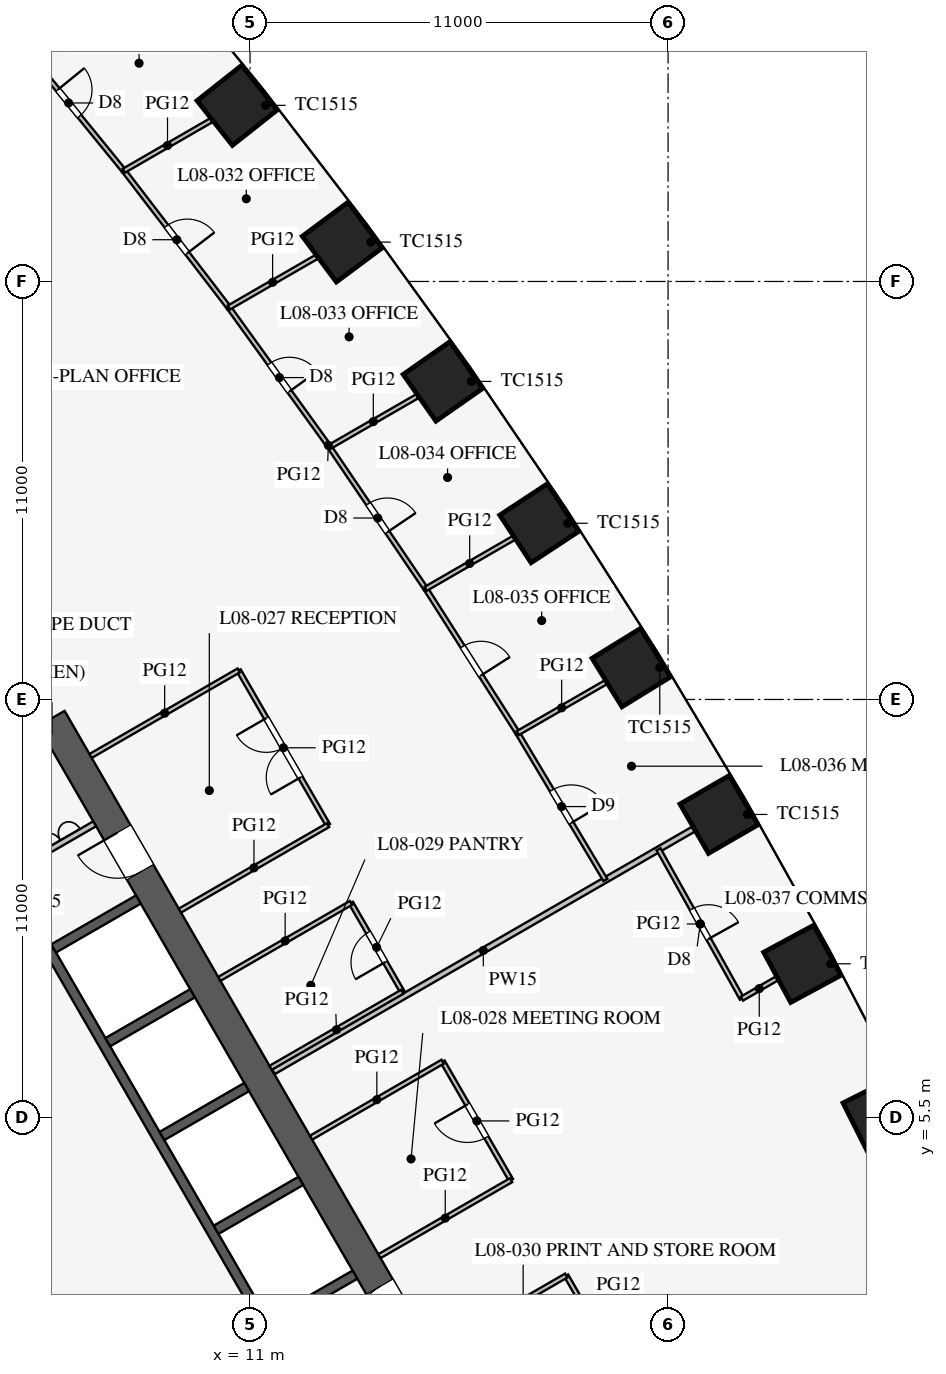
"""IFC4 building model, lengths in metres.
Left out: names, types, materials, properties, quantities, classifications, styles, units other than length and angle.
Written with IfcOpenShell. Run it as: python <this file> out.ifc"""

import sys

from ifc_helpers import new_model, si_unit, direction, frame, frame_2d, origin, origin_2d, place, context, subcontext, project, spatial, rectangle, extrude, element, fill, save


model = new_model("IFC4")
c1 = context("Model", 3, precision=1e-05, world=origin(), true_north=direction((0.0, 1.0)))
c2 = subcontext(c1, "Body", "Model", "MODEL_VIEW")
j1 = project(units=[si_unit("LENGTHUNIT", "METRE"), si_unit("PLANEANGLEUNIT", "RADIAN")], contexts=[c1])
p1 = place(None, origin())
s1 = spatial("IfcSite", under=j1, at=p1, CompositionType="ELEMENT")
p2 = place(p1, origin())
s2 = spatial("IfcBuilding", under=s1, at=p2, CompositionType="ELEMENT")
p3 = place(p2, frame((0.0, 0.0, 37.5)))
s3 = spatial("IfcBuildingStorey", under=s2, at=p3, CompositionType="ELEMENT", Elevation=37.5)
for number, where, z_axis, x_axis in (
    (1, (27.611, 5.549, 0.0), (0.0, 0.0, 1.0), (-0.449, 0.894, 0.0)),
    (2, (25.531, 9.544, 0.0), (0.0, 0.0, 1.0), (-0.475, 0.88, 0.0)),
    (3, (23.338, 13.474, 0.0), (0.0, 0.0, 1.0), (-0.5, 0.866, 0.0)),
    (4, (21.031, 17.339, 0.0), (0.0, 0.0, 1.0), (-0.525, 0.851, 0.0)),
    (5, (18.611, 21.137, 0.0), (0.0, 0.0, 1.0), (-0.549, 0.836, 0.0)),
    (6, (16.076, 24.87, 0.0), (0.0, 0.0, 1.0), (-0.574, 0.819, 0.0)),
    (7, (13.426, 28.536, 0.0), (0.0, 0.0, 1.0), (-0.597, 0.802, 0.0)),
    (8, (10.66, 32.135, 0.0), (0.0, 0.0, 1.0), (-0.62, 0.784, 0.0)),
):
    element("IfcColumn", number, at=place(p3, frame(where, z_axis=z_axis, x_axis=x_axis)), inside=s3, PredefinedType="COLUMN", context=c2, shape_type="SweptSolid", body=[
        extrude(rectangle(XDim=1.5, YDim=1.5, at=origin_2d()), origin(), (0.0, 0.0, 1.0), 4.2),
    ])
p4 = place(p3, frame((16.743, -3.0, 0.0), z_axis=(0.0, 0.0, 1.0), x_axis=(-0.500002442456, 0.866023993627, 0.0)))
e9 = element("IfcWall", 9, at=p4, inside=s3, PredefinedType="SHEAR", context=c2, shape_type="SweptSolid", body=[
    extrude(rectangle(XDim=21.939, YDim=0.8, at=frame_2d((10.97, 0.0))), origin(), (0.0, 0.0, 1.0), 4.2),
])
p5 = place(p4, frame((17.27, 0.0, 0.0)))
e10 = element("IfcOpeningElement", 10, at=p5, cuts=e9, PredefinedType="OPENING", context=c2, shape_type="SweptSolid", body=[
    extrude(rectangle(XDim=1.2, YDim=2.1, at=frame_2d((0.6, 1.05))), frame((0.0, 0.41, 0.0), z_axis=(0.0, -1.0, 0.0), x_axis=(1.0, 0.0, 0.0)), (0.0, 0.0, 1.0), 0.82),
])
p6 = place(p4, frame((3.47, 0.0, 0.0)))
e11 = element("IfcOpeningElement", 11, at=p6, cuts=e9, PredefinedType="OPENING", context=c2, shape_type="SweptSolid", body=[
    extrude(rectangle(XDim=1.2, YDim=2.1, at=frame_2d((0.6, 1.05))), frame((0.0, 0.41, 0.0), z_axis=(0.0, -1.0, 0.0), x_axis=(1.0, 0.0, 0.0)), (0.0, 0.0, 1.0), 0.82),
])
p7 = place(p3, frame((11.424, 0.014, 0.0), z_axis=(0.0, 0.0, 1.0), x_axis=(-0.500001763848, 0.866024385424, 0.0)))
e12 = element("IfcWall", 12, at=p7, inside=s3, PredefinedType="SHEAR", context=c2, shape_type="SweptSolid", body=[
    extrude(rectangle(XDim=11.4, YDim=0.25, at=frame_2d((5.7, 0.0))), origin(), (0.0, 0.0, 1.0), 4.2),
])
for number, where, z_axis, x_axis in (
    (13, (11.532, 0.076, 0.0), (0.0, 0.0, 1.0), (0.866, 0.5, 0.0)),
    (14, (10.107, 2.544, 0.0), (0.0, 0.0, 1.0), (0.866, 0.5, 0.0)),
    (15, (8.682, 5.012, 0.0), (0.0, 0.0, 1.0), (0.866, 0.5, 0.0)),
    (16, (7.257, 7.481, 0.0), (0.0, 0.0, 1.0), (0.866, 0.5, 0.0)),
):
    element("IfcWall", number, at=place(p3, frame(where, z_axis=z_axis, x_axis=x_axis)), inside=s3, PredefinedType="SHEAR", context=c2, shape_type="SweptSolid", body=[
        extrude(rectangle(XDim=2.575, YDim=0.25, at=frame_2d((1.288, 0.0))), origin(), (0.0, 0.0, 1.0), 4.2),
    ])
p8 = place(p3, frame((5.832, 9.949, 0.0), z_axis=(0.0, 0.0, 1.0), x_axis=(0.866029291668, 0.499993265928, 0.0)))
e17 = element("IfcWall", 17, at=p8, inside=s3, PredefinedType="SHEAR", context=c2, shape_type="SweptSolid", body=[
    extrude(rectangle(XDim=2.575, YDim=0.25, at=frame_2d((1.288, 0.0))), origin(), (0.0, 0.0, 1.0), 4.2),
])
p9 = place(p3, frame((2.495, 10.678, 0.0), z_axis=(0.0, 0.0, 1.0), x_axis=(0.86602216432, 0.500005610874, 0.0)))
e18 = element("IfcWall", 18, at=p9, inside=s3, PredefinedType="PARTITIONING", context=c2, shape_type="SweptSolid", body=[
    extrude(rectangle(XDim=5.1, YDim=0.15, at=frame_2d((2.55, 0.0))), origin(), (0.0, 0.0, 1.0), 4.0),
])
p10 = place(p9, frame((1.3, 0.0, 0.0)))
e19 = element("IfcOpeningElement", 19, at=p10, cuts=e18, PredefinedType="OPENING", context=c2, shape_type="SweptSolid", body=[
    extrude(rectangle(XDim=0.9, YDim=2.1, at=frame_2d((0.45, 1.05))), frame((0.0, 0.085, 0.0), z_axis=(0.0, -1.0, 0.0), x_axis=(1.0, 0.0, 0.0)), (0.0, 0.0, 1.0), 0.17),
])
p11 = place(p3, frame((11.613, 6.705, 0.0), z_axis=(0.0, 0.0, 1.0), x_axis=(0.86602785495, 0.499995754432, 0.0)))
e20 = element("IfcWall", 20, at=p11, inside=s3, PredefinedType="PARTITIONING", context=c2, shape_type="SweptSolid", body=[
    extrude(rectangle(XDim=12.759, YDim=0.15, at=frame_2d((6.379, 0.0))), origin(), (0.0, 0.0, 1.0), 3.2),
])
p12 = place(p3, frame((15.006, 8.808, 0.0), z_axis=(0.0, 0.0, 1.0), x_axis=(-0.500048589285, 0.86599734893, 0.0)))
e21 = element("IfcWall", 21, at=p12, inside=s3, PredefinedType="PARTITIONING", context=c2, shape_type="SweptSolid", body=[
    extrude(rectangle(XDim=2.7, YDim=0.12, at=frame_2d((1.35, 0.0))), origin(), (0.0, 0.0, 1.0), 2.9),
])
p13 = place(p12, frame((0.9, 0.0, 0.15)))
e22 = element("IfcOpeningElement", 22, at=p13, cuts=e21, PredefinedType="OPENING", context=c2, shape_type="SweptSolid", body=[
    extrude(rectangle(XDim=0.9, YDim=2.1, at=frame_2d((0.45, 1.05))), frame((0.0, 0.07, 0.0), z_axis=(0.0, -1.0, 0.0), x_axis=(1.0, 0.0, 0.0)), (0.0, 0.0, 1.0), 0.14),
])
p14 = place(p3, frame((13.052, 13.194, 0.0), z_axis=(0.0, 0.0, 1.0), x_axis=(-0.499977259774, 0.866038532462, 0.0)))
e23 = element("IfcWall", 23, at=p14, inside=s3, PredefinedType="PARTITIONING", context=c2, shape_type="SweptSolid", body=[
    extrude(rectangle(XDim=4.7, YDim=0.12, at=frame_2d((2.35, 0.0))), origin(), (0.0, 0.0, 1.0), 2.9),
])
p15 = place(p14, frame((1.45, 0.0, 0.15)))
e24 = element("IfcOpeningElement", 24, at=p15, cuts=e23, PredefinedType="OPENING", context=c2, shape_type="SweptSolid", body=[
    extrude(rectangle(XDim=1.8, YDim=2.1, at=frame_2d((0.9, 1.05))), frame((0.0, 0.07, 0.0), z_axis=(0.0, -1.0, 0.0), x_axis=(1.0, 0.0, 0.0)), (0.0, 0.0, 1.0), 0.14),
])
p16 = place(p3, frame((20.519, -0.74, 0.0), z_axis=(0.0, 0.0, 1.0), x_axis=(-0.499957262057, 0.866050077142, 0.0)))
e25 = element("IfcWall", 25, at=p16, inside=s3, PredefinedType="PARTITIONING", context=c2, shape_type="SweptSolid", body=[
    extrude(rectangle(XDim=2.4, YDim=0.12, at=frame_2d((1.2, 0.0))), origin(), (0.0, 0.0, 1.0), 2.9),
])
p17 = place(p16, frame((0.75, 0.0, 0.15)))
e26 = element("IfcOpeningElement", 26, at=p17, cuts=e25, PredefinedType="OPENING", context=c2, shape_type="SweptSolid", body=[
    extrude(rectangle(XDim=0.9, YDim=2.1, at=frame_2d((0.45, 1.05))), frame((0.0, 0.07, 0.0), z_axis=(0.0, -1.0, 0.0), x_axis=(1.0, 0.0, 0.0)), (0.0, 0.0, 1.0), 0.14),
])
p18 = place(p3, frame((17.869, 3.85, 0.0), z_axis=(0.0, 0.0, 1.0), x_axis=(-0.500012057535, 0.866018442252, 0.0)))
e27 = element("IfcWall", 27, at=p18, inside=s3, PredefinedType="PARTITIONING", context=c2, shape_type="SweptSolid", body=[
    extrude(rectangle(XDim=3.6, YDim=0.12, at=frame_2d((1.8, 0.0))), origin(), (0.0, 0.0, 1.0), 2.9),
])
p19 = place(p18, frame((1.3, 0.0, 0.15)))
e28 = element("IfcOpeningElement", 28, at=p19, cuts=e27, PredefinedType="OPENING", context=c2, shape_type="SweptSolid", body=[
    extrude(rectangle(XDim=1.0, YDim=2.1, at=frame_2d((0.5, 1.05))), frame((0.0, 0.07, 0.0), z_axis=(0.0, -1.0, 0.0), x_axis=(1.0, 0.0, 0.0)), (0.0, 0.0, 1.0), 0.14),
])
for number, where, z_axis, x_axis in (
    (29, (11.542, 6.808, 0.0), (0.0, 0.0, 1.0), (0.866, 0.5, 0.0)),
    (30, (10.192, 9.146, 0.0), (0.0, 0.0, 1.0), (0.866, 0.5, 0.0)),
):
    element("IfcWall", number, at=place(p3, frame(where, z_axis=z_axis, x_axis=x_axis)), inside=s3, PredefinedType="PARTITIONING", context=c2, shape_type="SweptSolid", body=[
        extrude(rectangle(XDim=4.0, YDim=0.12, at=frame_2d((2.0, 0.0))), origin(), (0.0, 0.0, 1.0), 2.9),
    ])
p20 = place(p3, frame((9.155, 10.944, 0.0), z_axis=(0.0, 0.0, 1.0), x_axis=(0.866017533419, 0.500013631625, 0.0)))
e31 = element("IfcWall", 31, at=p20, inside=s3, PredefinedType="PARTITIONING", context=c2, shape_type="SweptSolid", body=[
    extrude(rectangle(XDim=4.5, YDim=0.12, at=frame_2d((2.25, 0.0))), origin(), (0.0, 0.0, 1.0), 2.9),
])
p21 = place(p3, frame((6.805, 15.014, 0.0), z_axis=(0.0, 0.0, 1.0), x_axis=(0.866031096941, 0.499990139034, 0.0)))
e32 = element("IfcWall", 32, at=p21, inside=s3, PredefinedType="PARTITIONING", context=c2, shape_type="SweptSolid", body=[
    extrude(rectangle(XDim=4.5, YDim=0.12, at=frame_2d((2.25, 0.0))), origin(), (0.0, 0.0, 1.0), 2.9),
])
for number, where, z_axis, x_axis in (
    (33, (12.605, 4.968, 0.0), (0.0, 0.0, 1.0), (0.866, 0.5, 0.0)),
    (34, (14.405, 1.85, 0.0), (0.0, 0.0, 1.0), (0.866, 0.5, 0.0)),
    (35, (15.855, -0.661, 0.0), (0.0, 0.0, 1.0), (0.866, 0.5, 0.0)),
):
    element("IfcWall", number, at=place(p3, frame(where, z_axis=z_axis, x_axis=x_axis)), inside=s3, PredefinedType="PARTITIONING", context=c2, shape_type="SweptSolid", body=[
        extrude(rectangle(XDim=4.0, YDim=0.12, at=frame_2d((2.0, 0.0))), origin(), (0.0, 0.0, 1.0), 2.9),
    ])
p22 = place(p3, frame((20.351, 11.749, 0.0), z_axis=(0.0, 0.0, 1.0), x_axis=(-0.51252396108, 0.858672923364, 0.0)))
e36 = element("IfcWall", 36, at=p22, inside=s3, PredefinedType="PARTITIONING", context=c2, shape_type="SweptSolid", body=[
    extrude(rectangle(XDim=4.5, YDim=0.12, at=frame_2d((2.25, 0.0))), origin(), (0.0, 0.0, 1.0), 2.9),
])
p23 = place(p22, frame((1.75, 0.0, 0.15)))
e37 = element("IfcOpeningElement", 37, at=p23, cuts=e36, PredefinedType="OPENING", context=c2, shape_type="SweptSolid", body=[
    extrude(rectangle(XDim=1.0, YDim=2.1, at=frame_2d((0.5, 1.05))), frame((0.0, 0.07, 0.0), z_axis=(0.0, -1.0, 0.0), x_axis=(1.0, 0.0, 0.0)), (0.0, 0.0, 1.0), 0.14),
])
p24 = place(p3, frame((13.091, 23.146, 0.0), z_axis=(0.0, 0.0, 1.0), x_axis=(-0.58534077607, 0.810787380187, 0.0)))
e38 = element("IfcWall", 38, at=p24, inside=s3, PredefinedType="PARTITIONING", context=c2, shape_type="SweptSolid", body=[
    extrude(rectangle(XDim=4.523, YDim=0.12, at=frame_2d((2.262, 0.0))), origin(), (0.0, 0.0, 1.0), 2.9),
])
p25 = place(p24, frame((1.8, 0.0, 0.15)))
e39 = element("IfcOpeningElement", 39, at=p25, cuts=e38, PredefinedType="OPENING", context=c2, shape_type="SweptSolid", body=[
    extrude(rectangle(XDim=0.9, YDim=2.1, at=frame_2d((0.45, 1.05))), frame((0.0, 0.07, 0.0), z_axis=(0.0, -1.0, 0.0), x_axis=(1.0, 0.0, 0.0)), (0.0, 0.0, 1.0), 0.14),
])
p26 = place(p3, frame((10.443, 26.814, 0.0), z_axis=(0.0, 0.0, 1.0), x_axis=(-0.608818785139, 0.79330932609, 0.0)))
e40 = element("IfcWall", 40, at=p26, inside=s3, PredefinedType="PARTITIONING", context=c2, shape_type="SweptSolid", body=[
    extrude(rectangle(XDim=4.539, YDim=0.12, at=frame_2d((2.27, 0.0))), origin(), (0.0, 0.0, 1.0), 2.9),
])
p27 = place(p26, frame((1.8, 0.0, 0.15)))
e41 = element("IfcOpeningElement", 41, at=p27, cuts=e40, PredefinedType="OPENING", context=c2, shape_type="SweptSolid", body=[
    extrude(rectangle(XDim=0.9, YDim=2.1, at=frame_2d((0.45, 1.05))), frame((0.0, 0.07, 0.0), z_axis=(0.0, -1.0, 0.0), x_axis=(1.0, 0.0, 0.0)), (0.0, 0.0, 1.0), 0.14),
])
p28 = place(p3, frame((7.679, 30.415, 0.0), z_axis=(0.0, 0.0, 1.0), x_axis=(-0.631833879056, 0.775103831288, 0.0)))
e42 = element("IfcWall", 42, at=p28, inside=s3, PredefinedType="PARTITIONING", context=c2, shape_type="SweptSolid", body=[
    extrude(rectangle(XDim=4.558, YDim=0.12, at=frame_2d((2.279, 0.0))), origin(), (0.0, 0.0, 1.0), 2.9),
])
p29 = place(p28, frame((1.85, 0.0, 0.15)))
e43 = element("IfcOpeningElement", 43, at=p29, cuts=e42, PredefinedType="OPENING", context=c2, shape_type="SweptSolid", body=[
    extrude(rectangle(XDim=0.9, YDim=2.1, at=frame_2d((0.45, 1.05))), frame((0.0, 0.07, 0.0), z_axis=(0.0, -1.0, 0.0), x_axis=(1.0, 0.0, 0.0)), (0.0, 0.0, 1.0), 0.14),
])
p30 = place(p3, frame((18.044, 15.614, 0.0), z_axis=(0.0, 0.0, 1.0), x_axis=(-0.537243691336, 0.843427066272, 0.0)))
e44 = element("IfcWall", 44, at=p30, inside=s3, PredefinedType="PARTITIONING", context=c2, shape_type="SweptSolid", body=[
    extrude(rectangle(XDim=4.504, YDim=0.12, at=frame_2d((2.252, 0.0))), origin(), (0.0, 0.0, 1.0), 2.9),
])
p31 = place(p30, frame((1.8, 0.0, 0.15)))
e45 = element("IfcOpeningElement", 45, at=p31, cuts=e44, PredefinedType="OPENING", context=c2, shape_type="SweptSolid", body=[
    extrude(rectangle(XDim=0.9, YDim=2.1, at=frame_2d((0.45, 1.05))), frame((0.0, 0.07, 0.0), z_axis=(0.0, -1.0, 0.0), x_axis=(1.0, 0.0, 0.0)), (0.0, 0.0, 1.0), 0.14),
])
p32 = place(p3, frame((15.624, 19.413, 0.0), z_axis=(0.0, 0.0, 1.0), x_axis=(-0.561512004239, 0.827468591002, 0.0)))
e46 = element("IfcWall", 46, at=p32, inside=s3, PredefinedType="PARTITIONING", context=c2, shape_type="SweptSolid", body=[
    extrude(rectangle(XDim=4.512, YDim=0.12, at=frame_2d((2.256, 0.0))), origin(), (0.0, 0.0, 1.0), 2.9),
])
p33 = place(p32, frame((1.8, 0.0, 0.15)))
e47 = element("IfcOpeningElement", 47, at=p33, cuts=e46, PredefinedType="OPENING", context=c2, shape_type="SweptSolid", body=[
    extrude(rectangle(XDim=0.9, YDim=2.1, at=frame_2d((0.45, 1.05))), frame((0.0, 0.07, 0.0), z_axis=(0.0, -1.0, 0.0), x_axis=(1.0, 0.0, 0.0)), (0.0, 0.0, 1.0), 0.14),
])
p34 = place(p3, frame((23.943, 8.627, 0.0), z_axis=(0.0, 0.0, 1.0), x_axis=(-0.487415216275, 0.87317031955, 0.0)))
e48 = element("IfcWall", 48, at=p34, inside=s3, PredefinedType="PARTITIONING", context=c2, shape_type="SweptSolid", body=[
    extrude(rectangle(XDim=4.5, YDim=0.12, at=frame_2d((2.25, 0.0))), origin(), (0.0, 0.0, 1.0), 2.9),
])
p35 = place(p34, frame((1.8, 0.0, 0.15)))
e49 = element("IfcOpeningElement", 49, at=p35, cuts=e48, PredefinedType="OPENING", context=c2, shape_type="SweptSolid", body=[
    extrude(rectangle(XDim=0.9, YDim=2.1, at=frame_2d((0.45, 1.05))), frame((0.0, 0.07, 0.0), z_axis=(0.0, -1.0, 0.0), x_axis=(1.0, 0.0, 0.0)), (0.0, 0.0, 1.0), 0.14),
])
p36 = place(p3, frame((13.091, 23.146, 0.0), z_axis=(0.0, 0.0, 1.0), x_axis=(0.866023818221, 0.500002746266, 0.0)))
e50 = element("IfcWall", 50, at=p36, inside=s3, PredefinedType="PARTITIONING", context=c2, shape_type="SweptSolid", body=[
    extrude(rectangle(XDim=2.664, YDim=0.12, at=frame_2d((1.332, 0.0))), origin(), (0.0, 0.0, 1.0), 2.9),
])
p37 = place(p3, frame((10.443, 26.814, 0.0), z_axis=(0.0, 0.0, 1.0), x_axis=(0.866031171652, 0.499990009627, 0.0)))
e51 = element("IfcWall", 51, at=p37, inside=s3, PredefinedType="PARTITIONING", context=c2, shape_type="SweptSolid", body=[
    extrude(rectangle(XDim=2.659, YDim=0.12, at=frame_2d((1.33, 0.0))), origin(), (0.0, 0.0, 1.0), 2.9),
])
p38 = place(p3, frame((7.679, 30.415, 0.0), z_axis=(0.0, 0.0, 1.0), x_axis=(0.866026229868, 0.499998569178, 0.0)))
e52 = element("IfcWall", 52, at=p38, inside=s3, PredefinedType="PARTITIONING", context=c2, shape_type="SweptSolid", body=[
    extrude(rectangle(XDim=2.653, YDim=0.12, at=frame_2d((1.327, 0.0))), origin(), (0.0, 0.0, 1.0), 2.9),
])
p39 = place(p3, frame((18.044, 15.614, 0.0), z_axis=(0.0, 0.0, 1.0), x_axis=(0.866022619654, 0.500004822225, 0.0)))
e53 = element("IfcWall", 53, at=p39, inside=s3, PredefinedType="PARTITIONING", context=c2, shape_type="SweptSolid", body=[
    extrude(rectangle(XDim=2.669, YDim=0.12, at=frame_2d((1.335, 0.0))), origin(), (0.0, 0.0, 1.0), 2.9),
])
p40 = place(p3, frame((15.624, 19.413, 0.0), z_axis=(0.0, 0.0, 1.0), x_axis=(0.866020974757, 0.500007671222, 0.0)))
e54 = element("IfcWall", 54, at=p40, inside=s3, PredefinedType="PARTITIONING", context=c2, shape_type="SweptSolid", body=[
    extrude(rectangle(XDim=2.667, YDim=0.12, at=frame_2d((1.334, 0.0))), origin(), (0.0, 0.0, 1.0), 2.9),
])
p41 = place(p3, frame((23.943, 8.627, 0.0), z_axis=(0.0, 0.0, 1.0), x_axis=(0.866054481515, 0.499949632511, 0.0)))
e55 = element("IfcWall", 55, at=p41, inside=s3, PredefinedType="PARTITIONING", context=c2, shape_type="SweptSolid", body=[
    extrude(rectangle(XDim=1.054, YDim=0.12, at=frame_2d((0.527, 0.0))), origin(), (0.0, 0.0, 1.0), 2.9),
])
p42 = place(p5, origin())
e56 = element("IfcDoor", 56, at=p42, inside=s3, OperationType="SINGLE_SWING_RIGHT", PredefinedType="DOOR", context=c2, shape_type="SweptSolid", body=[
    extrude(rectangle(XDim=1.2, YDim=2.1, at=frame_2d((0.6, 1.05))), frame((0.0, 0.025, 0.0), z_axis=(0.0, -1.0, 0.0), x_axis=(1.0, 0.0, 0.0)), (0.0, 0.0, 1.0), 0.05),
])
fill(e10, e56)
p43 = place(p6, origin())
e57 = element("IfcDoor", 57, at=p43, inside=s3, OperationType="SINGLE_SWING_LEFT", PredefinedType="DOOR", context=c2, shape_type="SweptSolid", body=[
    extrude(rectangle(XDim=1.2, YDim=2.1, at=frame_2d((0.6, 1.05))), frame((0.0, 0.025, 0.0), z_axis=(0.0, -1.0, 0.0), x_axis=(1.0, 0.0, 0.0)), (0.0, 0.0, 1.0), 0.05),
])
fill(e11, e57)
p44 = place(p15, origin())
e58 = element("IfcDoor", 58, at=p44, inside=s3, OperationType="DOUBLE_DOOR_SINGLE_SWING", PredefinedType="DOOR", context=c2, shape_type="SweptSolid", body=[
    extrude(rectangle(XDim=1.8, YDim=2.1, at=frame_2d((0.9, 1.05))), frame((0.0, 0.025, 0.0), z_axis=(0.0, -1.0, 0.0), x_axis=(1.0, 0.0, 0.0)), (0.0, 0.0, 1.0), 0.05),
])
fill(e24, e58)
p45 = place(p19, origin())
e59 = element("IfcDoor", 59, at=p45, inside=s3, OperationType="SINGLE_SWING_RIGHT", PredefinedType="DOOR", context=c2, shape_type="SweptSolid", body=[
    extrude(rectangle(XDim=1.0, YDim=2.1, at=frame_2d((0.5, 1.05))), frame((0.0, 0.025, 0.0), z_axis=(0.0, -1.0, 0.0), x_axis=(1.0, 0.0, 0.0)), (0.0, 0.0, 1.0), 0.05),
])
fill(e28, e59)
p46 = place(p13, origin())
e60 = element("IfcDoor", 60, at=p46, inside=s3, OperationType="SINGLE_SWING_LEFT", PredefinedType="DOOR", context=c2, shape_type="SweptSolid", body=[
    extrude(rectangle(XDim=0.9, YDim=2.1, at=frame_2d((0.45, 1.05))), frame((0.0, 0.025, 0.0), z_axis=(0.0, -1.0, 0.0), x_axis=(1.0, 0.0, 0.0)), (0.0, 0.0, 1.0), 0.05),
])
fill(e22, e60)
p47 = place(p29, frame((0.9, 0.0, 0.0), z_axis=(0.0, 0.0, 1.0), x_axis=(-1.0, 0.0, 0.0)))
e61 = element("IfcDoor", 61, at=p47, inside=s3, OperationType="SINGLE_SWING_LEFT", PredefinedType="DOOR", context=c2, shape_type="SweptSolid", body=[
    extrude(rectangle(XDim=0.9, YDim=2.1, at=frame_2d((0.45, 1.05))), frame((0.0, 0.025, 0.0), z_axis=(0.0, -1.0, 0.0), x_axis=(1.0, 0.0, 0.0)), (0.0, 0.0, 1.0), 0.05),
])
fill(e43, e61)
p48 = place(p27, frame((0.9, 0.0, 0.0), z_axis=(0.0, 0.0, 1.0), x_axis=(-1.0, 0.0, 0.0)))
e62 = element("IfcDoor", 62, at=p48, inside=s3, OperationType="SINGLE_SWING_RIGHT", PredefinedType="DOOR", context=c2, shape_type="SweptSolid", body=[
    extrude(rectangle(XDim=0.9, YDim=2.1, at=frame_2d((0.45, 1.05))), frame((0.0, 0.025, 0.0), z_axis=(0.0, -1.0, 0.0), x_axis=(1.0, 0.0, 0.0)), (0.0, 0.0, 1.0), 0.05),
])
fill(e41, e62)
p49 = place(p25, frame((0.9, 0.0, 0.0), z_axis=(0.0, 0.0, 1.0), x_axis=(-1.0, 0.0, 0.0)))
e63 = element("IfcDoor", 63, at=p49, inside=s3, OperationType="SINGLE_SWING_RIGHT", PredefinedType="DOOR", context=c2, shape_type="SweptSolid", body=[
    extrude(rectangle(XDim=0.9, YDim=2.1, at=frame_2d((0.45, 1.05))), frame((0.0, 0.025, 0.0), z_axis=(0.0, -1.0, 0.0), x_axis=(1.0, 0.0, 0.0)), (0.0, 0.0, 1.0), 0.05),
])
fill(e39, e63)
p50 = place(p33, frame((0.9, 0.0, 0.0), z_axis=(0.0, 0.0, 1.0), x_axis=(-1.0, 0.0, 0.0)))
e64 = element("IfcDoor", 64, at=p50, inside=s3, OperationType="SINGLE_SWING_RIGHT", PredefinedType="DOOR", context=c2, shape_type="SweptSolid", body=[
    extrude(rectangle(XDim=0.9, YDim=2.1, at=frame_2d((0.45, 1.05))), frame((0.0, 0.025, 0.0), z_axis=(0.0, -1.0, 0.0), x_axis=(1.0, 0.0, 0.0)), (0.0, 0.0, 1.0), 0.05),
])
fill(e47, e64)
p51 = place(p31, frame((0.9, 0.0, 0.0), z_axis=(0.0, 0.0, 1.0), x_axis=(-1.0, 0.0, 0.0)))
e65 = element("IfcDoor", 65, at=p51, inside=s3, OperationType="SINGLE_SWING_RIGHT", PredefinedType="DOOR", context=c2, shape_type="SweptSolid", body=[
    extrude(rectangle(XDim=0.9, YDim=2.1, at=frame_2d((0.45, 1.05))), frame((0.0, 0.025, 0.0), z_axis=(0.0, -1.0, 0.0), x_axis=(1.0, 0.0, 0.0)), (0.0, 0.0, 1.0), 0.05),
])
fill(e45, e65)
p52 = place(p23, frame((1.0, 0.0, 0.0), z_axis=(0.0, 0.0, 1.0), x_axis=(-1.0, 0.0, 0.0)))
e66 = element("IfcDoor", 66, at=p52, inside=s3, OperationType="SINGLE_SWING_RIGHT", PredefinedType="DOOR", context=c2, shape_type="SweptSolid", body=[
    extrude(rectangle(XDim=1.0, YDim=2.1, at=frame_2d((0.5, 1.05))), frame((0.0, 0.025, 0.0), z_axis=(0.0, -1.0, 0.0), x_axis=(1.0, 0.0, 0.0)), (0.0, 0.0, 1.0), 0.05),
])
fill(e37, e66)
p53 = place(p35, frame((0.9, 0.0, 0.0), z_axis=(0.0, 0.0, 1.0), x_axis=(-1.0, 0.0, 0.0)))
e67 = element("IfcDoor", 67, at=p53, inside=s3, OperationType="SINGLE_SWING_RIGHT", PredefinedType="DOOR", context=c2, shape_type="SweptSolid", body=[
    extrude(rectangle(XDim=0.9, YDim=2.1, at=frame_2d((0.45, 1.05))), frame((0.0, 0.025, 0.0), z_axis=(0.0, -1.0, 0.0), x_axis=(1.0, 0.0, 0.0)), (0.0, 0.0, 1.0), 0.05),
])
fill(e49, e67)
save(model, sys.argv[1])
